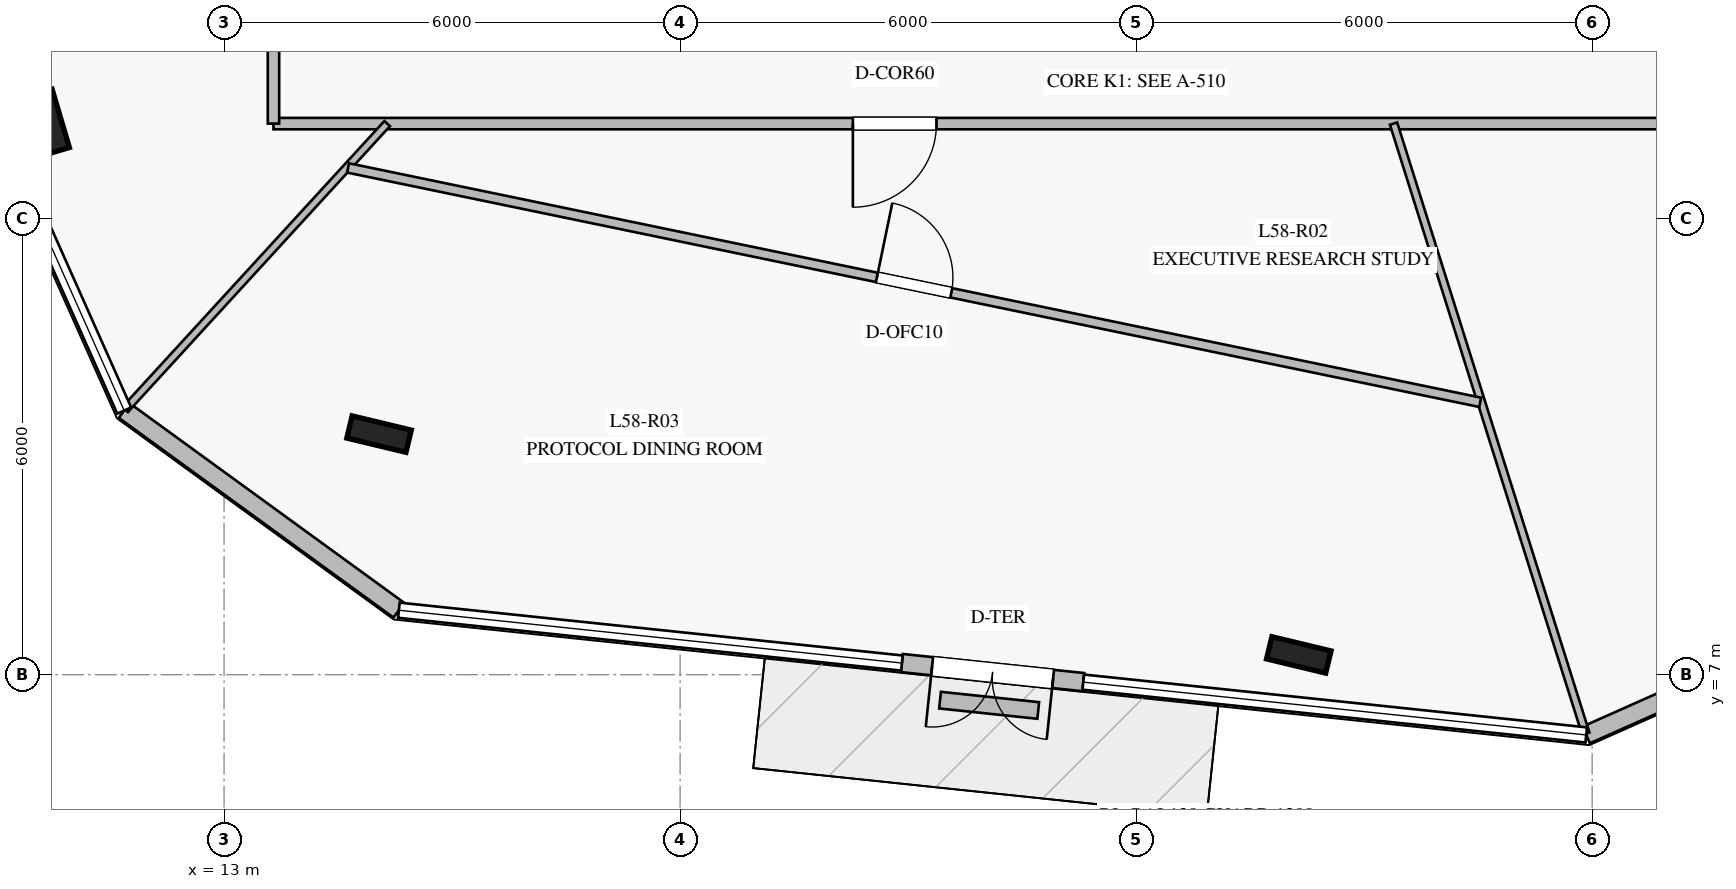
"""IFC4 building model, lengths in metres.
Left out: names, types, materials, properties, quantities, classifications, styles, units other than length and angle.
Written with IfcOpenShell. Run it as: python <this file> out.ifc"""

import sys

from ifc_helpers import new_model, si_unit, direction, frame, frame_2d, origin, origin_2d, place, context, subcontext, project, spatial, rectangle, i_section, extrude, element, fill, save


model = new_model("IFC4")
c1 = context("Model", 3, precision=1e-05, world=origin(), true_north=direction((0.0, 1.0)))
c2 = subcontext(c1, "Body", "Model", "MODEL_VIEW")
j1 = project(units=[si_unit("LENGTHUNIT", "METRE"), si_unit("PLANEANGLEUNIT", "RADIAN")], contexts=[c1])
p1 = place(None, origin())
s1 = spatial("IfcSite", under=j1, at=p1, CompositionType="ELEMENT")
p2 = place(p1, origin())
s2 = spatial("IfcBuilding", under=s1, at=p2, CompositionType="ELEMENT")
p3 = place(p2, frame((0.0, 0.0, 240.8)))
s3 = spatial("IfcBuildingStorey", under=s2, at=p3, CompositionType="ELEMENT", Elevation=240.8)
for number, where, z_axis, x_axis in (
    (1, (10.707, 14.276, 0.0), (0.0, 0.0, 1.0), (-0.284, 0.959, 0.0)),
    (2, (15.039, 10.165, 0.0), (0.0, 0.0, 1.0), (-0.972, 0.233, 0.0)),
    (3, (27.14, 7.26, 0.0), (0.0, 0.0, 1.0), (-0.972, 0.233, 0.0)),
):
    element("IfcColumn", number, at=place(p3, frame(where, z_axis=z_axis, x_axis=x_axis)), inside=s3, PredefinedType="COLUMN", context=c2, shape_type="SweptSolid", body=[
        extrude(i_section(OverallWidth=0.3, OverallDepth=0.8, WebThickness=0.018, FlangeThickness=0.033, at=origin_2d()), origin(), (0.0, 0.0, 1.0), 4.0),
    ])
p4 = place(p3, frame((11.686, 10.475, 0.0), z_axis=(0.0, 0.0, 1.0), x_axis=(0.808861298874, -0.587999489102, 0.0)))
e4 = element("IfcWall", 4, at=p4, inside=s3, PredefinedType="STANDARD", context=c2, shape_type="SweptSolid", body=[
    extrude(rectangle(XDim=4.468, YDim=0.24, at=frame_2d((2.234, 0.0))), origin(), (0.0, 0.0, 1.0), 3.7),
])
p5 = place(p3, frame((21.918, 7.153, 0.0), z_axis=(0.0, 0.0, 1.0), x_axis=(0.994517708252, -0.10456829335, 0.0)))
e5 = element("IfcWall", 5, at=p5, inside=s3, PredefinedType="STANDARD", context=c2, shape_type="SweptSolid", body=[
    extrude(rectangle(XDim=2.4, YDim=0.24, at=frame_2d((1.2, 0.0))), origin(), (0.0, 0.0, 1.0), 3.7),
])
p6 = place(p5, frame((0.4, 0.0, 0.0)))
e6 = element("IfcOpeningElement", 6, at=p6, cuts=e5, PredefinedType="OPENING", context=c2, shape_type="SweptSolid", body=[
    extrude(rectangle(XDim=1.6, YDim=2.25, at=frame_2d((0.8, 1.125))), frame((0.0, 0.13, 0.0), z_axis=(0.0, -1.0, 0.0), x_axis=(1.0, 0.0, 0.0)), (0.0, 0.0, 1.0), 0.26),
])
p7 = place(p3, frame((30.922, 6.207, 0.0), z_axis=(0.0, 0.0, 1.0), x_axis=(0.913581562374, 0.406655540833, 0.0)))
e7 = element("IfcWall", 7, at=p7, inside=s3, PredefinedType="STANDARD", context=c2, shape_type="SweptSolid", body=[
    extrude(rectangle(XDim=4.468, YDim=0.24, at=frame_2d((2.234, 0.0))), origin(), (0.0, 0.0, 1.0), 3.7),
])
p8 = place(p3, frame((22.42, 6.665, 0.0), z_axis=(0.0, 0.0, 1.0), x_axis=(0.994506482607, -0.104675002043, 0.0)))
e8 = element("IfcWall", 8, at=p8, inside=s3, PredefinedType="USERDEFINED", context=c2, shape_type="SweptSolid", body=[
    extrude(rectangle(XDim=1.299, YDim=0.22, at=frame_2d((0.649, 0.0))), origin(), (0.0, 0.0, 1.0), 0.4),
])
p9 = place(p3, frame((36.35, 14.25, 0.0), z_axis=(0.0, 0.0, 1.0), x_axis=(-1.0, 0.0, 0.0)))
e9 = element("IfcWall", 9, at=p9, inside=s3, PredefinedType="PARTITIONING", context=c2, shape_type="SweptSolid", body=[
    extrude(rectangle(XDim=22.7, YDim=0.15, at=frame_2d((11.35, 0.0))), origin(), (0.0, 0.0, 1.0), 3.2),
])
p10 = place(p9, frame((13.977, 0.0, 0.0)))
e10 = element("IfcOpeningElement", 10, at=p10, cuts=e9, PredefinedType="OPENING", context=c2, shape_type="SweptSolid", body=[
    extrude(rectangle(XDim=1.1, YDim=2.2, at=frame_2d((0.55, 1.1))), frame((0.0, 0.085, 0.0), z_axis=(0.0, -1.0, 0.0), x_axis=(1.0, 0.0, 0.0)), (0.0, 0.0, 1.0), 0.17),
])
p11 = place(p3, frame((13.65, 14.25, 0.0), z_axis=(0.0, 0.0, 1.0), x_axis=(0.0, 1.0, 0.0)))
e11 = element("IfcWall", 11, at=p11, inside=s3, PredefinedType="PARTITIONING", context=c2, shape_type="SweptSolid", body=[
    extrude(rectangle(XDim=21.5, YDim=0.15, at=frame_2d((10.75, 0.0))), origin(), (0.0, 0.0, 1.0), 3.2),
])
p12 = place(p11, frame((4.958, 0.0, 0.0)))
e12 = element("IfcOpeningElement", 12, at=p12, cuts=e11, PredefinedType="OPENING", context=c2, shape_type="SweptSolid", body=[
    extrude(rectangle(XDim=1.1, YDim=2.2, at=frame_2d((0.55, 1.1))), frame((0.0, 0.085, 0.0), z_axis=(0.0, -1.0, 0.0), x_axis=(1.0, 0.0, 0.0)), (0.0, 0.0, 1.0), 0.17),
])
p13 = place(p11, frame((15.251, 0.0, 0.0)))
e13 = element("IfcOpeningElement", 13, at=p13, cuts=e11, PredefinedType="OPENING", context=c2, shape_type="SweptSolid", body=[
    extrude(rectangle(XDim=1.1, YDim=2.2, at=frame_2d((0.55, 1.1))), frame((0.0, 0.085, 0.0), z_axis=(0.0, -1.0, 0.0), x_axis=(1.0, 0.0, 0.0)), (0.0, 0.0, 1.0), 0.17),
])
p14 = place(p3, frame((15.146, 14.25, 0.0), z_axis=(0.0, 0.0, 1.0), x_axis=(-0.675770128833, -0.737112428994, 0.0)))
e14 = element("IfcWall", 14, at=p14, inside=s3, PredefinedType="MOVABLE", context=c2, shape_type="SweptSolid", body=[
    extrude(rectangle(XDim=5.102, YDim=0.1, at=frame_2d((2.551, 0.0))), origin(), (0.0, 0.0, 1.0), 3.1),
])
p15 = place(p3, frame((28.387, 14.25, 0.0), z_axis=(0.0, 0.0, 1.0), x_axis=(0.300543965323, -0.953767961775, 0.0)))
e15 = element("IfcWall", 15, at=p15, inside=s3, PredefinedType="MOVABLE", context=c2, shape_type="SweptSolid", body=[
    extrude(rectangle(XDim=8.415, YDim=0.1, at=frame_2d((4.208, 0.0))), origin(), (0.0, 0.0, 1.0), 3.1),
])
p16 = place(p3, frame((14.631, 13.667, 0.0), z_axis=(0.0, 0.0, 1.0), x_axis=(0.979233619367, -0.202735094894, 0.0)))
e16 = element("IfcWall", 16, at=p16, inside=s3, PredefinedType="PARTITIONING", context=c2, shape_type="SweptSolid", body=[
    extrude(rectangle(XDim=15.212, YDim=0.125, at=frame_2d((7.606, 0.0))), origin(), (0.0, 0.0, 1.0), 3.2),
])
p17 = place(p16, frame((7.106, 0.0, 0.0)))
e17 = element("IfcOpeningElement", 17, at=p17, cuts=e16, PredefinedType="OPENING", context=c2, shape_type="SweptSolid", body=[
    extrude(rectangle(XDim=1.0, YDim=2.15, at=frame_2d((0.5, 1.075))), frame((0.0, 0.073, 0.0), z_axis=(0.0, -1.0, 0.0), x_axis=(1.0, 0.0, 0.0)), (0.0, 0.0, 1.0), 0.145),
])
p18 = place(p6, frame((1.6, 0.0, 0.0), z_axis=(0.0, 0.0, 1.0), x_axis=(-1.0, 0.0, 0.0)))
e18 = element("IfcDoor", 18, at=p18, inside=s3, OperationType="DOUBLE_DOOR_SINGLE_SWING", PredefinedType="DOOR", context=c2, shape_type="SweptSolid", body=[
    extrude(rectangle(XDim=1.6, YDim=2.25, at=frame_2d((0.8, 1.125))), frame((0.0, 0.025, 0.0), z_axis=(0.0, -1.0, 0.0), x_axis=(1.0, 0.0, 0.0)), (0.0, 0.0, 1.0), 0.05),
])
fill(e6, e18)
p19 = place(p10, origin())
e19 = element("IfcDoor", 19, at=p19, inside=s3, OperationType="SINGLE_SWING_RIGHT", PredefinedType="DOOR", context=c2, shape_type="SweptSolid", body=[
    extrude(rectangle(XDim=1.1, YDim=2.2, at=frame_2d((0.55, 1.1))), frame((0.0, 0.025, 0.0), z_axis=(0.0, -1.0, 0.0), x_axis=(1.0, 0.0, 0.0)), (0.0, 0.0, 1.0), 0.05),
])
fill(e10, e19)
p20 = place(p17, origin())
e20 = element("IfcDoor", 20, at=p20, inside=s3, OperationType="SINGLE_SWING_LEFT", PredefinedType="DOOR", context=c2, shape_type="SweptSolid", body=[
    extrude(rectangle(XDim=1.0, YDim=2.15, at=frame_2d((0.5, 1.075))), frame((0.0, 0.025, 0.0), z_axis=(0.0, -1.0, 0.0), x_axis=(1.0, 0.0, 0.0)), (0.0, 0.0, 1.0), 0.05),
])
fill(e17, e20)
save(model, sys.argv[1])
